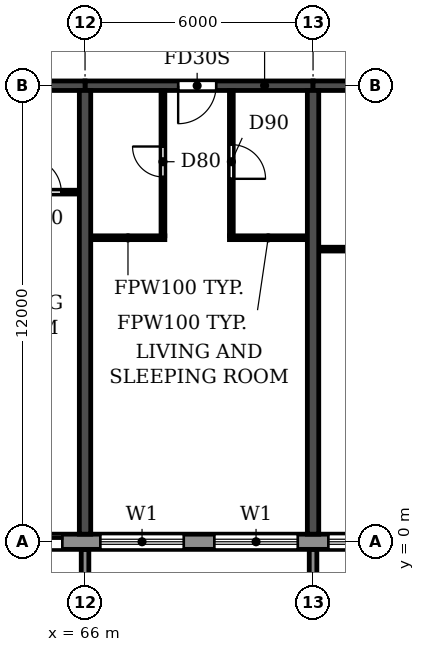
"""IFC4 building model, lengths in metres.
Left out: names, types, materials, properties, quantities, classifications, styles, units other than length and angle.
Written with IfcOpenShell. Run it as: python <this file> out.ifc"""

import sys

from ifc_helpers import new_model, si_unit, direction, frame, frame_2d, origin, place, context, subcontext, project, spatial, polyline, rectangle, outline, extrude, source, transform, mapped, element, fill, save


model = new_model("IFC4")
c1 = context("Model", 3, precision=1e-05, world=origin(), true_north=direction((0.0, 1.0)))
c2 = subcontext(c1, "Body", "Model", "MODEL_VIEW")
j1 = project(units=[si_unit("LENGTHUNIT", "METRE"), si_unit("PLANEANGLEUNIT", "RADIAN")], contexts=[c1])
p1 = place(None, origin())
s1 = spatial("IfcSite", under=j1, at=p1, CompositionType="ELEMENT")
p2 = place(p1, origin())
s2 = spatial("IfcBuilding", under=s1, at=p2, CompositionType="ELEMENT")
p3 = place(p2, frame((0.0, 0.0, 152.1)))
s3 = spatial("IfcBuildingStorey", under=s2, at=p3, CompositionType="ELEMENT", Elevation=152.1)
for number, where, z_axis, x_axis in (
    (1, (66.0, 0.2, 0.0), (0.0, 0.0, 1.0), (0.0, 1.0, 0.0)),
    (2, (72.0, 0.2, 0.0), (0.0, 0.0, 1.0), (0.0, 1.0, 0.0)),
):
    element("IfcWall", number, at=place(p3, frame(where, z_axis=z_axis, x_axis=x_axis)), inside=s3, PredefinedType="SHEAR", context=c2, shape_type="SweptSolid", body=[
        extrude(rectangle(XDim=11.675, YDim=0.3, at=frame_2d((5.837, 0.0))), origin(), (0.0, 0.0, 1.0), 3.07),
    ])
p4 = place(p3, frame((60.0, 12.0, 0.0), z_axis=(0.0, 0.0, 1.0), x_axis=(1.0, 0.0, 0.0)))
e3 = element("IfcWall", 3, at=p4, inside=s3, PredefinedType="SHEAR", context=c2, shape_type="SweptSolid", body=[
    extrude(rectangle(XDim=6.0, YDim=0.25, at=frame_2d((3.0, 0.0))), origin(), (0.0, 0.0, 1.0), 2.47),
])
p5 = place(p4, frame((2.45, 0.0, 0.0)))
e4 = element("IfcOpeningElement", 4, at=p5, cuts=e3, PredefinedType="OPENING", context=c2, shape_type="SweptSolid", body=[
    extrude(rectangle(XDim=1.0, YDim=2.1, at=frame_2d((0.5, 1.05))), frame((0.0, 0.135, 0.0), z_axis=(0.0, -1.0, 0.0), x_axis=(1.0, 0.0, 0.0)), (0.0, 0.0, 1.0), 0.27),
])
p6 = place(p3, frame((66.0, 12.0, 0.0), z_axis=(0.0, 0.0, 1.0), x_axis=(1.0, 0.0, 0.0)))
e5 = element("IfcWall", 5, at=p6, inside=s3, PredefinedType="SHEAR", context=c2, shape_type="SweptSolid", body=[
    extrude(rectangle(XDim=6.0, YDim=0.25, at=frame_2d((3.0, 0.0))), origin(), (0.0, 0.0, 1.0), 2.47),
])
p7 = place(p6, frame((2.45, 0.0, 0.0)))
e6 = element("IfcOpeningElement", 6, at=p7, cuts=e5, PredefinedType="OPENING", context=c2, shape_type="SweptSolid", body=[
    extrude(rectangle(XDim=1.0, YDim=2.1, at=frame_2d((0.5, 1.05))), frame((0.0, 0.135, 0.0), z_axis=(0.0, -1.0, 0.0), x_axis=(1.0, 0.0, 0.0)), (0.0, 0.0, 1.0), 0.27),
])
p8 = place(p3, frame((72.0, 12.0, 0.0), z_axis=(0.0, 0.0, 1.0), x_axis=(1.0, 0.0, 0.0)))
e7 = element("IfcWall", 7, at=p8, inside=s3, PredefinedType="SHEAR", context=c2, shape_type="SweptSolid", body=[
    extrude(rectangle(XDim=6.0, YDim=0.25, at=frame_2d((3.0, 0.0))), origin(), (0.0, 0.0, 1.0), 2.47),
])
p9 = place(p8, frame((2.45, 0.0, 0.0)))
e8 = element("IfcOpeningElement", 8, at=p9, cuts=e7, PredefinedType="OPENING", context=c2, shape_type="SweptSolid", body=[
    extrude(rectangle(XDim=1.0, YDim=2.1, at=frame_2d((0.5, 1.05))), frame((0.0, 0.135, 0.0), z_axis=(0.0, -1.0, 0.0), x_axis=(1.0, 0.0, 0.0)), (0.0, 0.0, 1.0), 0.27),
])
p10 = place(p3, frame((16.683, 0.0, 0.0), z_axis=(0.0, 0.0, 1.0), x_axis=(1.0, 0.0, 0.0)))
e9 = element("IfcWall", 9, at=p10, inside=s3, PredefinedType="STANDARD", context=c2, shape_type="SweptSolid", body=[
    extrude(rectangle(XDim=68.634, YDim=0.4, at=frame_2d((34.317, 0.0))), origin(), (0.0, 0.0, 1.0), 3.07),
])
p11 = place(p10, frame((1.717, 0.0, 0.9)))
e10 = element("IfcOpeningElement", 10, at=p11, cuts=e9, PredefinedType="OPENING", context=c2, shape_type="SweptSolid", body=[
    extrude(rectangle(XDim=2.2, YDim=1.5, at=frame_2d((1.1, 0.75))), frame((0.0, 0.21, 0.0), z_axis=(0.0, -1.0, 0.0), x_axis=(1.0, 0.0, 0.0)), (0.0, 0.0, 1.0), 0.42),
])
p12 = place(p10, frame((4.717, 0.0, 0.9)))
e11 = element("IfcOpeningElement", 11, at=p12, cuts=e9, PredefinedType="OPENING", context=c2, shape_type="SweptSolid", body=[
    extrude(rectangle(XDim=2.2, YDim=1.5, at=frame_2d((1.1, 0.75))), frame((0.0, 0.21, 0.0), z_axis=(0.0, -1.0, 0.0), x_axis=(1.0, 0.0, 0.0)), (0.0, 0.0, 1.0), 0.42),
])
p13 = place(p10, frame((7.917, 0.0, 0.0)))
e12 = element("IfcOpeningElement", 12, at=p13, cuts=e9, PredefinedType="OPENING", context=c2, shape_type="SweptSolid", body=[
    extrude(rectangle(XDim=1.8, YDim=2.4, at=frame_2d((0.9, 1.2))), frame((0.0, 0.21, 0.0), z_axis=(0.0, -1.0, 0.0), x_axis=(1.0, 0.0, 0.0)), (0.0, 0.0, 1.0), 0.42),
])
p14 = place(p10, frame((10.717, 0.0, 0.9)))
e13 = element("IfcOpeningElement", 13, at=p14, cuts=e9, PredefinedType="OPENING", context=c2, shape_type="SweptSolid", body=[
    extrude(rectangle(XDim=2.2, YDim=1.5, at=frame_2d((1.1, 0.75))), frame((0.0, 0.21, 0.0), z_axis=(0.0, -1.0, 0.0), x_axis=(1.0, 0.0, 0.0)), (0.0, 0.0, 1.0), 0.42),
])
p15 = place(p10, frame((13.717, 0.0, 0.9)))
e14 = element("IfcOpeningElement", 14, at=p15, cuts=e9, PredefinedType="OPENING", context=c2, shape_type="SweptSolid", body=[
    extrude(rectangle(XDim=2.2, YDim=1.5, at=frame_2d((1.1, 0.75))), frame((0.0, 0.21, 0.0), z_axis=(0.0, -1.0, 0.0), x_axis=(1.0, 0.0, 0.0)), (0.0, 0.0, 1.0), 0.42),
])
p16 = place(p10, frame((16.717, 0.0, 0.9)))
e15 = element("IfcOpeningElement", 15, at=p16, cuts=e9, PredefinedType="OPENING", context=c2, shape_type="SweptSolid", body=[
    extrude(rectangle(XDim=2.2, YDim=1.5, at=frame_2d((1.1, 0.75))), frame((0.0, 0.21, 0.0), z_axis=(0.0, -1.0, 0.0), x_axis=(1.0, 0.0, 0.0)), (0.0, 0.0, 1.0), 0.42),
])
p17 = place(p10, frame((19.717, 0.0, 0.9)))
e16 = element("IfcOpeningElement", 16, at=p17, cuts=e9, PredefinedType="OPENING", context=c2, shape_type="SweptSolid", body=[
    extrude(rectangle(XDim=2.2, YDim=1.5, at=frame_2d((1.1, 0.75))), frame((0.0, 0.21, 0.0), z_axis=(0.0, -1.0, 0.0), x_axis=(1.0, 0.0, 0.0)), (0.0, 0.0, 1.0), 0.42),
])
p18 = place(p10, frame((22.917, 0.0, 0.0)))
e17 = element("IfcOpeningElement", 17, at=p18, cuts=e9, PredefinedType="OPENING", context=c2, shape_type="SweptSolid", body=[
    extrude(rectangle(XDim=1.8, YDim=2.4, at=frame_2d((0.9, 1.2))), frame((0.0, 0.21, 0.0), z_axis=(0.0, -1.0, 0.0), x_axis=(1.0, 0.0, 0.0)), (0.0, 0.0, 1.0), 0.42),
])
p19 = place(p10, frame((25.717, 0.0, 0.9)))
e18 = element("IfcOpeningElement", 18, at=p19, cuts=e9, PredefinedType="OPENING", context=c2, shape_type="SweptSolid", body=[
    extrude(rectangle(XDim=2.2, YDim=1.5, at=frame_2d((1.1, 0.75))), frame((0.0, 0.21, 0.0), z_axis=(0.0, -1.0, 0.0), x_axis=(1.0, 0.0, 0.0)), (0.0, 0.0, 1.0), 0.42),
])
p20 = place(p10, frame((28.717, 0.0, 0.9)))
e19 = element("IfcOpeningElement", 19, at=p20, cuts=e9, PredefinedType="OPENING", context=c2, shape_type="SweptSolid", body=[
    extrude(rectangle(XDim=2.2, YDim=1.5, at=frame_2d((1.1, 0.75))), frame((0.0, 0.21, 0.0), z_axis=(0.0, -1.0, 0.0), x_axis=(1.0, 0.0, 0.0)), (0.0, 0.0, 1.0), 0.42),
])
p21 = place(p10, frame((31.917, 0.0, 0.0)))
e20 = element("IfcOpeningElement", 20, at=p21, cuts=e9, PredefinedType="OPENING", context=c2, shape_type="SweptSolid", body=[
    extrude(rectangle(XDim=1.8, YDim=2.4, at=frame_2d((0.9, 1.2))), frame((0.0, 0.21, 0.0), z_axis=(0.0, -1.0, 0.0), x_axis=(1.0, 0.0, 0.0)), (0.0, 0.0, 1.0), 0.42),
])
p22 = place(p10, frame((34.717, 0.0, 0.9)))
e21 = element("IfcOpeningElement", 21, at=p22, cuts=e9, PredefinedType="OPENING", context=c2, shape_type="SweptSolid", body=[
    extrude(rectangle(XDim=2.2, YDim=1.5, at=frame_2d((1.1, 0.75))), frame((0.0, 0.21, 0.0), z_axis=(0.0, -1.0, 0.0), x_axis=(1.0, 0.0, 0.0)), (0.0, 0.0, 1.0), 0.42),
])
p23 = place(p10, frame((37.717, 0.0, 0.9)))
e22 = element("IfcOpeningElement", 22, at=p23, cuts=e9, PredefinedType="OPENING", context=c2, shape_type="SweptSolid", body=[
    extrude(rectangle(XDim=2.2, YDim=1.5, at=frame_2d((1.1, 0.75))), frame((0.0, 0.21, 0.0), z_axis=(0.0, -1.0, 0.0), x_axis=(1.0, 0.0, 0.0)), (0.0, 0.0, 1.0), 0.42),
])
p24 = place(p10, frame((40.717, 0.0, 0.9)))
e23 = element("IfcOpeningElement", 23, at=p24, cuts=e9, PredefinedType="OPENING", context=c2, shape_type="SweptSolid", body=[
    extrude(rectangle(XDim=2.2, YDim=1.5, at=frame_2d((1.1, 0.75))), frame((0.0, 0.21, 0.0), z_axis=(0.0, -1.0, 0.0), x_axis=(1.0, 0.0, 0.0)), (0.0, 0.0, 1.0), 0.42),
])
p25 = place(p10, frame((43.717, 0.0, 0.9)))
e24 = element("IfcOpeningElement", 24, at=p25, cuts=e9, PredefinedType="OPENING", context=c2, shape_type="SweptSolid", body=[
    extrude(rectangle(XDim=2.2, YDim=1.5, at=frame_2d((1.1, 0.75))), frame((0.0, 0.21, 0.0), z_axis=(0.0, -1.0, 0.0), x_axis=(1.0, 0.0, 0.0)), (0.0, 0.0, 1.0), 0.42),
])
p26 = place(p10, frame((46.917, 0.0, 0.0)))
e25 = element("IfcOpeningElement", 25, at=p26, cuts=e9, PredefinedType="OPENING", context=c2, shape_type="SweptSolid", body=[
    extrude(rectangle(XDim=1.8, YDim=2.4, at=frame_2d((0.9, 1.2))), frame((0.0, 0.21, 0.0), z_axis=(0.0, -1.0, 0.0), x_axis=(1.0, 0.0, 0.0)), (0.0, 0.0, 1.0), 0.42),
])
p27 = place(p10, frame((49.717, 0.0, 0.9)))
e26 = element("IfcOpeningElement", 26, at=p27, cuts=e9, PredefinedType="OPENING", context=c2, shape_type="SweptSolid", body=[
    extrude(rectangle(XDim=2.2, YDim=1.5, at=frame_2d((1.1, 0.75))), frame((0.0, 0.21, 0.0), z_axis=(0.0, -1.0, 0.0), x_axis=(1.0, 0.0, 0.0)), (0.0, 0.0, 1.0), 0.42),
])
p28 = place(p10, frame((52.717, 0.0, 0.9)))
e27 = element("IfcOpeningElement", 27, at=p28, cuts=e9, PredefinedType="OPENING", context=c2, shape_type="SweptSolid", body=[
    extrude(rectangle(XDim=2.2, YDim=1.5, at=frame_2d((1.1, 0.75))), frame((0.0, 0.21, 0.0), z_axis=(0.0, -1.0, 0.0), x_axis=(1.0, 0.0, 0.0)), (0.0, 0.0, 1.0), 0.42),
])
p29 = place(p10, frame((55.717, 0.0, 0.9)))
e28 = element("IfcOpeningElement", 28, at=p29, cuts=e9, PredefinedType="OPENING", context=c2, shape_type="SweptSolid", body=[
    extrude(rectangle(XDim=2.2, YDim=1.5, at=frame_2d((1.1, 0.75))), frame((0.0, 0.21, 0.0), z_axis=(0.0, -1.0, 0.0), x_axis=(1.0, 0.0, 0.0)), (0.0, 0.0, 1.0), 0.42),
])
p30 = place(p10, frame((58.917, 0.0, 0.0)))
e29 = element("IfcOpeningElement", 29, at=p30, cuts=e9, PredefinedType="OPENING", context=c2, shape_type="SweptSolid", body=[
    extrude(rectangle(XDim=1.8, YDim=2.4, at=frame_2d((0.9, 1.2))), frame((0.0, 0.21, 0.0), z_axis=(0.0, -1.0, 0.0), x_axis=(1.0, 0.0, 0.0)), (0.0, 0.0, 1.0), 0.42),
])
p31 = place(p10, frame((61.717, 0.0, 0.9)))
e30 = element("IfcOpeningElement", 30, at=p31, cuts=e9, PredefinedType="OPENING", context=c2, shape_type="SweptSolid", body=[
    extrude(rectangle(XDim=2.2, YDim=1.5, at=frame_2d((1.1, 0.75))), frame((0.0, 0.21, 0.0), z_axis=(0.0, -1.0, 0.0), x_axis=(1.0, 0.0, 0.0)), (0.0, 0.0, 1.0), 0.42),
])
p32 = place(p10, frame((64.717, 0.0, 0.9)))
e31 = element("IfcOpeningElement", 31, at=p32, cuts=e9, PredefinedType="OPENING", context=c2, shape_type="SweptSolid", body=[
    extrude(rectangle(XDim=2.2, YDim=1.5, at=frame_2d((1.1, 0.75))), frame((0.0, 0.21, 0.0), z_axis=(0.0, -1.0, 0.0), x_axis=(1.0, 0.0, 0.0)), (0.0, 0.0, 1.0), 0.42),
])
m1 = source(origin(), c2, "Body", "SweptSolid", [
    extrude(outline(polyline([(0.0, 0.0), (0.2, 0.0), (0.2, 1.65), (0.0, 1.65), (0.0, 0.0)])), origin(), (0.0, 0.0, 1.0), 3.1),
])
for number, where in (
    (32, (65.9, -1.85, 0.0)),
    (33, (71.9, -1.85, 0.0)),
):
    element("IfcWall", number, at=place(p3, frame(where)), inside=s3, PredefinedType="STANDARD", context=c2, shape_type="MappedRepresentation", body=[
        mapped(m1, transform((0.0, 0.0, 0.0))),
    ])
for number, where, z_axis, x_axis in (
    (34, (72.16, 7.7, 0.0), (0.0, 0.0, 1.0), (1.0, 0.0, 0.0)),
    (35, (66.16, 8.0, 0.0), (0.0, 0.0, 1.0), (1.0, 0.0, 0.0)),
):
    element("IfcWall", number, at=place(p3, frame(where, z_axis=z_axis, x_axis=x_axis)), inside=s3, PredefinedType="PARTITIONING", context=c2, shape_type="SweptSolid", body=[
        extrude(rectangle(XDim=1.94, YDim=0.1, at=frame_2d((0.97, 0.0))), origin(), (0.0, 0.0, 1.0), 3.07),
    ])
p33 = place(p3, frame((69.8, 8.0, 0.0), z_axis=(0.0, 0.0, 1.0), x_axis=(1.0, 0.0, 0.0)))
e36 = element("IfcWall", 36, at=p33, inside=s3, PredefinedType="PARTITIONING", context=c2, shape_type="SweptSolid", body=[
    extrude(rectangle(XDim=2.04, YDim=0.1, at=frame_2d((1.02, 0.0))), origin(), (0.0, 0.0, 1.0), 3.07),
])
p34 = place(p3, frame((63.8, 9.2, 0.0), z_axis=(0.0, 0.0, 1.0), x_axis=(1.0, 0.0, 0.0)))
e37 = element("IfcWall", 37, at=p34, inside=s3, PredefinedType="PARTITIONING", context=c2, shape_type="SweptSolid", body=[
    extrude(rectangle(XDim=2.04, YDim=0.1, at=frame_2d((1.02, 0.0))), origin(), (0.0, 0.0, 1.0), 3.07),
])
p35 = place(p34, frame((0.675, 0.0, 0.0)))
e38 = element("IfcOpeningElement", 38, at=p35, cuts=e37, PredefinedType="OPENING", context=c2, shape_type="SweptSolid", body=[
    extrude(rectangle(XDim=0.9, YDim=2.1, at=frame_2d((0.45, 1.05))), frame((0.0, 0.06, 0.0), z_axis=(0.0, -1.0, 0.0), x_axis=(1.0, 0.0, 0.0)), (0.0, 0.0, 1.0), 0.12),
])
p36 = place(p3, frame((68.05, 8.05, 0.0), z_axis=(0.0, 0.0, 1.0), x_axis=(0.0, 1.0, 0.0)))
e39 = element("IfcWall", 39, at=p36, inside=s3, PredefinedType="PARTITIONING", context=c2, shape_type="SweptSolid", body=[
    extrude(rectangle(XDim=3.815, YDim=0.1, at=frame_2d((1.907, 0.0))), origin(), (0.0, 0.0, 1.0), 3.07),
])
p37 = place(p36, frame((1.55, 0.0, 0.0)))
e40 = element("IfcOpeningElement", 40, at=p37, cuts=e39, PredefinedType="OPENING", context=c2, shape_type="SweptSolid", body=[
    extrude(rectangle(XDim=0.8, YDim=2.1, at=frame_2d((0.4, 1.05))), frame((0.0, 0.06, 0.0), z_axis=(0.0, -1.0, 0.0), x_axis=(1.0, 0.0, 0.0)), (0.0, 0.0, 1.0), 0.12),
])
p38 = place(p3, frame((69.85, 8.05, 0.0), z_axis=(0.0, 0.0, 1.0), x_axis=(0.0, 1.0, 0.0)))
e41 = element("IfcWall", 41, at=p38, inside=s3, PredefinedType="PARTITIONING", context=c2, shape_type="SweptSolid", body=[
    extrude(rectangle(XDim=3.815, YDim=0.1, at=frame_2d((1.907, 0.0))), origin(), (0.0, 0.0, 1.0), 3.07),
])
p39 = place(p38, frame((1.5, 0.0, 0.0)))
e42 = element("IfcOpeningElement", 42, at=p39, cuts=e41, PredefinedType="OPENING", context=c2, shape_type="SweptSolid", body=[
    extrude(rectangle(XDim=0.9, YDim=2.1, at=frame_2d((0.45, 1.05))), frame((0.0, 0.06, 0.0), z_axis=(0.0, -1.0, 0.0), x_axis=(1.0, 0.0, 0.0)), (0.0, 0.0, 1.0), 0.12),
])
p40 = place(p26, origin())
e43 = element("IfcDoor", 43, at=p40, inside=s3, OperationType="DOUBLE_DOOR_SLIDING", PredefinedType="DOOR", context=c2, shape_type="SweptSolid", body=[
    extrude(rectangle(XDim=1.8, YDim=2.4, at=frame_2d((0.9, 1.2))), frame((0.0, 0.025, 0.0), z_axis=(0.0, -1.0, 0.0), x_axis=(1.0, 0.0, 0.0)), (0.0, 0.0, 1.0), 0.05),
])
fill(e25, e43)
p41 = place(p27, origin())
e44 = element("IfcWindow", 44, at=p41, inside=s3, PartitioningType="DOUBLE_PANEL_HORIZONTAL", PredefinedType="WINDOW", context=c2, shape_type="SweptSolid", body=[
    extrude(rectangle(XDim=2.2, YDim=1.5, at=frame_2d((1.1, 0.75))), frame((0.0, 0.03, 0.0), z_axis=(0.0, -1.0, 0.0), x_axis=(1.0, 0.0, 0.0)), (0.0, 0.0, 1.0), 0.06),
])
fill(e26, e44)
p42 = place(p28, origin())
e45 = element("IfcWindow", 45, at=p42, inside=s3, PartitioningType="DOUBLE_PANEL_HORIZONTAL", PredefinedType="WINDOW", context=c2, shape_type="SweptSolid", body=[
    extrude(rectangle(XDim=2.2, YDim=1.5, at=frame_2d((1.1, 0.75))), frame((0.0, 0.03, 0.0), z_axis=(0.0, -1.0, 0.0), x_axis=(1.0, 0.0, 0.0)), (0.0, 0.0, 1.0), 0.06),
])
fill(e27, e45)
p43 = place(p29, origin())
e46 = element("IfcWindow", 46, at=p43, inside=s3, PartitioningType="DOUBLE_PANEL_HORIZONTAL", PredefinedType="WINDOW", context=c2, shape_type="SweptSolid", body=[
    extrude(rectangle(XDim=2.2, YDim=1.5, at=frame_2d((1.1, 0.75))), frame((0.0, 0.03, 0.0), z_axis=(0.0, -1.0, 0.0), x_axis=(1.0, 0.0, 0.0)), (0.0, 0.0, 1.0), 0.06),
])
fill(e28, e46)
p44 = place(p35, origin())
e47 = element("IfcDoor", 47, at=p44, inside=s3, OperationType="SINGLE_SWING_LEFT", PredefinedType="DOOR", context=c2, shape_type="SweptSolid", body=[
    extrude(rectangle(XDim=0.9, YDim=2.1, at=frame_2d((0.45, 1.05))), frame((0.0, 0.025, 0.0), z_axis=(0.0, -1.0, 0.0), x_axis=(1.0, 0.0, 0.0)), (0.0, 0.0, 1.0), 0.05),
])
fill(e38, e47)
p45 = place(p37, origin())
e48 = element("IfcDoor", 48, at=p45, inside=s3, OperationType="SINGLE_SWING_RIGHT", PredefinedType="DOOR", context=c2, shape_type="SweptSolid", body=[
    extrude(rectangle(XDim=0.8, YDim=2.1, at=frame_2d((0.4, 1.05))), frame((0.0, 0.025, 0.0), z_axis=(0.0, -1.0, 0.0), x_axis=(1.0, 0.0, 0.0)), (0.0, 0.0, 1.0), 0.05),
])
fill(e40, e48)
p46 = place(p7, frame((1.0, 0.0, 0.0), z_axis=(0.0, 0.0, 1.0), x_axis=(-1.0, 0.0, 0.0)))
e49 = element("IfcDoor", 49, at=p46, inside=s3, OperationType="SINGLE_SWING_RIGHT", PredefinedType="DOOR", context=c2, shape_type="SweptSolid", body=[
    extrude(rectangle(XDim=1.0, YDim=2.1, at=frame_2d((0.5, 1.05))), frame((0.0, 0.025, 0.0), z_axis=(0.0, -1.0, 0.0), x_axis=(1.0, 0.0, 0.0)), (0.0, 0.0, 1.0), 0.05),
])
fill(e6, e49)
p47 = place(p39, frame((0.9, 0.0, 0.0), z_axis=(0.0, 0.0, 1.0), x_axis=(-1.0, 0.0, 0.0)))
e50 = element("IfcDoor", 50, at=p47, inside=s3, OperationType="SINGLE_SWING_RIGHT", PredefinedType="DOOR", context=c2, shape_type="SweptSolid", body=[
    extrude(rectangle(XDim=0.9, YDim=2.1, at=frame_2d((0.45, 1.05))), frame((0.0, 0.025, 0.0), z_axis=(0.0, -1.0, 0.0), x_axis=(1.0, 0.0, 0.0)), (0.0, 0.0, 1.0), 0.05),
])
fill(e42, e50)
save(model, sys.argv[1])
